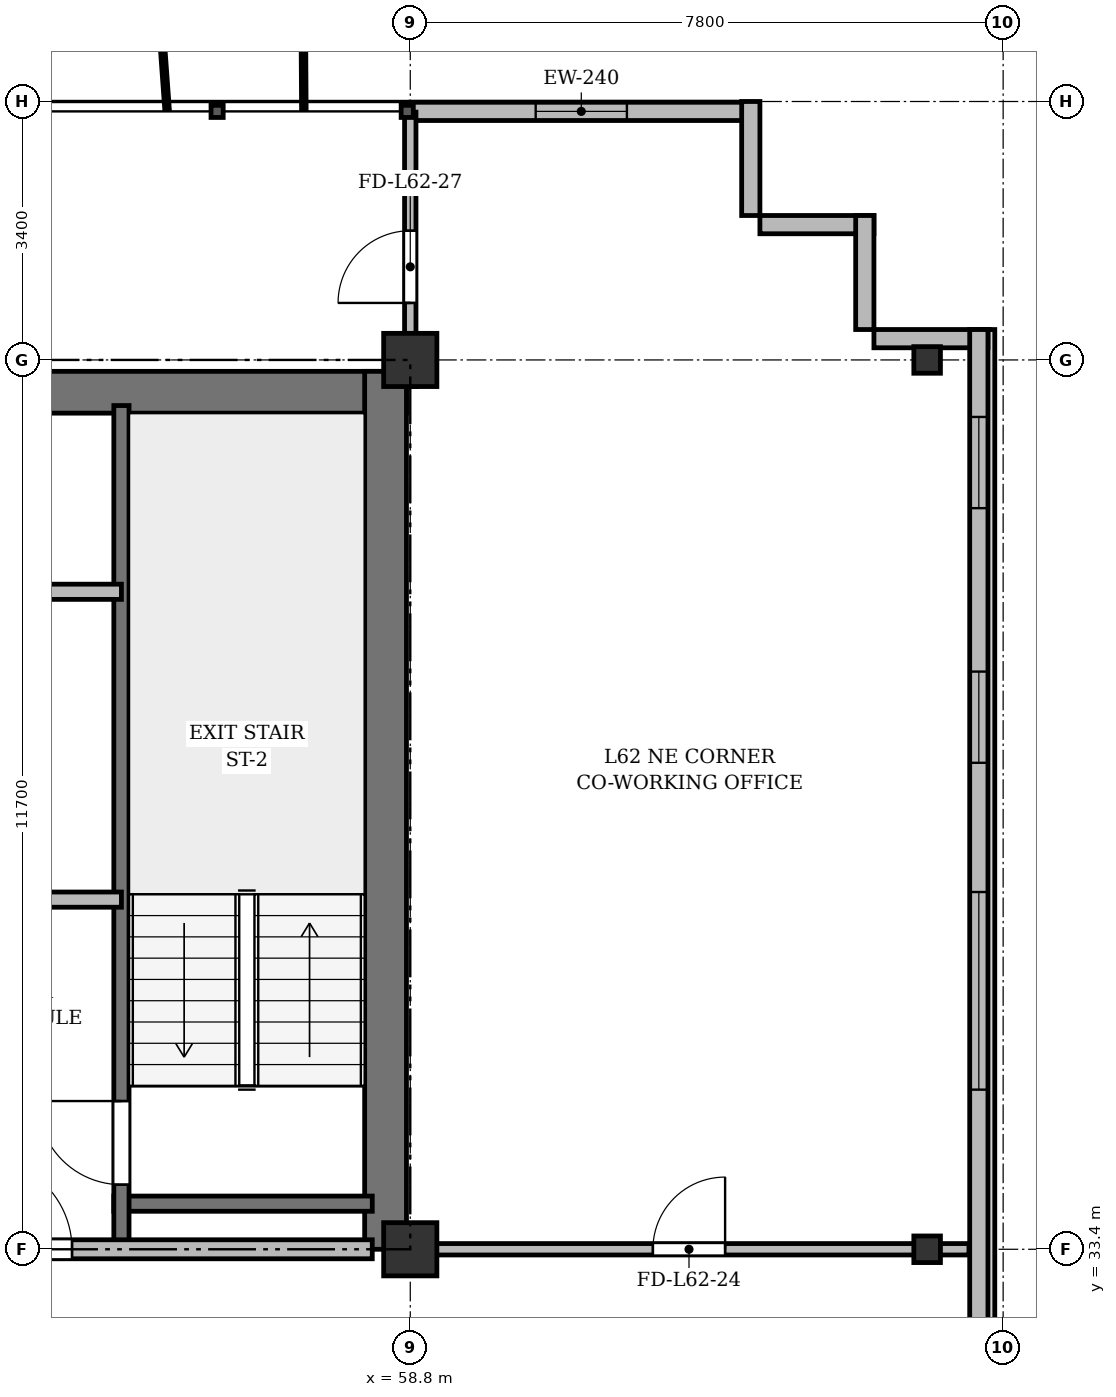
"""IFC4 building model, lengths in metres.
Left out: names, types, materials, properties, quantities, classifications, styles, units other than length and angle.
Written with IfcOpenShell. Run it as: python <this file> out.ifc"""

import sys

from ifc_helpers import new_model, si_unit, direction, frame, frame_2d, origin, origin_2d, place, context, subcontext, project, spatial, rectangle, i_section, extrude, source, transform, mapped, element, fill, save


model = new_model("IFC4")
c1 = context("Model", 3, precision=1e-05, world=origin(), true_north=direction((0.0, 1.0)))
c2 = subcontext(c1, "Body", "Model", "MODEL_VIEW")
j1 = project(units=[si_unit("LENGTHUNIT", "METRE"), si_unit("PLANEANGLEUNIT", "RADIAN")], contexts=[c1])
p1 = place(None, origin())
s1 = spatial("IfcSite", under=j1, at=p1, CompositionType="ELEMENT")
p2 = place(p1, origin())
s2 = spatial("IfcBuilding", under=s1, at=p2, CompositionType="ELEMENT")
p3 = place(p2, frame((0.0, 0.0, 237.3)))
s3 = spatial("IfcBuildingStorey", under=s2, at=p3, CompositionType="ELEMENT", Elevation=237.3)
m1 = source(origin(), c2, "Body", "SweptSolid", [
    extrude(rectangle(XDim=0.7, YDim=0.7, at=origin_2d()), origin(), (0.0, 0.0, 1.0), 3.6),
])
for number, where, z_axis, x_axis in (
    (1, (58.8, 33.4, 0.0), (0.0, 0.0, 1.0), (1.0, 0.0, 0.0)),
    (2, (58.8, 45.1, 0.0), (0.0, 0.0, 1.0), (1.0, 0.0, 0.0)),
):
    element("IfcColumn", number, at=place(p3, frame(where, z_axis=z_axis, x_axis=x_axis)), inside=s3, PredefinedType="COLUMN", context=c2, shape_type="MappedRepresentation", body=[
        mapped(m1, transform((0.0, 0.0, 0.0), x_axis=(1.0, 0.0, 0.0), y_axis=(0.0, 1.0, 0.0), z_axis=(0.0, 0.0, 1.0), scale=1.0)),
    ])
m2 = source(origin(), c2, "Body", "SweptSolid", [
    extrude(i_section(OverallWidth=0.35, OverallDepth=0.35, WebThickness=0.018, FlangeThickness=0.028, at=origin_2d()), origin(), (0.0, 0.0, 1.0), 3.6),
])
for number, where, z_axis, x_axis in (
    (3, (65.6, 33.4, 0.0), (0.0, 0.0, 1.0), (1.0, 0.0, 0.0)),
    (4, (65.6, 45.1, 0.0), (0.0, 0.0, 1.0), (1.0, 0.0, 0.0)),
):
    element("IfcColumn", number, at=place(p3, frame(where, z_axis=z_axis, x_axis=x_axis)), inside=s3, PredefinedType="COLUMN", context=c2, shape_type="MappedRepresentation", body=[
        mapped(m2, transform((0.0, 0.0, 0.0), x_axis=(1.0, 0.0, 0.0), y_axis=(0.0, 1.0, 0.0), z_axis=(0.0, 0.0, 1.0), scale=1.0)),
    ])
p4 = place(p3, frame((58.8, 48.37, 0.0), z_axis=(0.0, 0.0, 1.0), x_axis=(1.0, 0.0, 0.0)))
e5 = element("IfcWall", 5, at=p4, inside=s3, PredefinedType="SOLIDWALL", context=c2, shape_type="SweptSolid", body=[
    extrude(rectangle(XDim=4.5, YDim=0.24, at=frame_2d((2.25, 0.0))), origin(), (0.0, 0.0, 1.0), 3.22),
])
p5 = place(p4, frame((1.65, 0.0, 0.9)))
e6 = element("IfcOpeningElement", 6, at=p5, cuts=e5, PredefinedType="OPENING", context=c2, shape_type="SweptSolid", body=[
    extrude(rectangle(XDim=1.2, YDim=1.65, at=frame_2d((0.6, 0.825))), frame((0.0, 0.13, 0.0), z_axis=(0.0, -1.0, 0.0), x_axis=(1.0, 0.0, 0.0)), (0.0, 0.0, 1.0), 0.26),
])
for number, where, z_axis, x_axis in (
    (7, (63.28, 48.5, 0.0), (0.0, 0.0, 1.0), (0.0, -1.0, 0.0)),
    (8, (63.4, 46.88, 0.0), (0.0, 0.0, 1.0), (1.0, 0.0, 0.0)),
    (9, (64.78, 47.0, 0.0), (0.0, 0.0, 1.0), (0.0, -1.0, 0.0)),
    (10, (64.9, 45.38, 0.0), (0.0, 0.0, 1.0), (1.0, 0.0, 0.0)),
):
    element("IfcWall", number, at=place(p3, frame(where, z_axis=z_axis, x_axis=x_axis)), inside=s3, PredefinedType="SOLIDWALL", context=c2, shape_type="SweptSolid", body=[
        extrude(rectangle(XDim=1.5, YDim=0.24, at=frame_2d((0.75, 0.0))), origin(), (0.0, 0.0, 1.0), 3.22),
    ])
p6 = place(p3, frame((66.28, 45.5, 0.0), z_axis=(0.0, 0.0, 1.0), x_axis=(0.0, -1.0, 0.0)))
e11 = element("IfcWall", 11, at=p6, inside=s3, PredefinedType="SOLIDWALL", context=c2, shape_type="SweptSolid", body=[
    extrude(rectangle(XDim=39.1, YDim=0.24, at=frame_2d((19.55, 0.0))), origin(), (0.0, 0.0, 1.0), 3.22),
])
p7 = place(p6, frame((36.45, 0.0, 0.92)))
e12 = element("IfcOpeningElement", 12, at=p7, cuts=e11, PredefinedType="OPENING", context=c2, shape_type="SweptSolid", body=[
    extrude(rectangle(XDim=1.2, YDim=1.65, at=frame_2d((0.6, 0.825))), frame((0.0, 0.13, 0.0), z_axis=(0.0, -1.0, 0.0), x_axis=(1.0, 0.0, 0.0)), (0.0, 0.0, 1.0), 0.26),
])
p8 = place(p6, frame((32.8, 0.0, 0.92)))
e13 = element("IfcOpeningElement", 13, at=p8, cuts=e11, PredefinedType="OPENING", context=c2, shape_type="SweptSolid", body=[
    extrude(rectangle(XDim=2.6, YDim=1.9, at=frame_2d((1.3, 0.95))), frame((0.0, 0.13, 0.0), z_axis=(0.0, -1.0, 0.0), x_axis=(1.0, 0.0, 0.0)), (0.0, 0.0, 1.0), 0.26),
])
p9 = place(p6, frame((28.6, 0.0, 0.92)))
e14 = element("IfcOpeningElement", 14, at=p9, cuts=e11, PredefinedType="OPENING", context=c2, shape_type="SweptSolid", body=[
    extrude(rectangle(XDim=2.6, YDim=1.9, at=frame_2d((1.3, 0.95))), frame((0.0, 0.13, 0.0), z_axis=(0.0, -1.0, 0.0), x_axis=(1.0, 0.0, 0.0)), (0.0, 0.0, 1.0), 0.26),
])
p10 = place(p6, frame((21.4, 0.0, 0.92)))
e15 = element("IfcOpeningElement", 15, at=p10, cuts=e11, PredefinedType="OPENING", context=c2, shape_type="SweptSolid", body=[
    extrude(rectangle(XDim=2.6, YDim=1.9, at=frame_2d((1.3, 0.95))), frame((0.0, 0.13, 0.0), z_axis=(0.0, -1.0, 0.0), x_axis=(1.0, 0.0, 0.0)), (0.0, 0.0, 1.0), 0.26),
])
p11 = place(p6, frame((7.4, 0.0, 0.92)))
e16 = element("IfcOpeningElement", 16, at=p11, cuts=e11, PredefinedType="OPENING", context=c2, shape_type="SweptSolid", body=[
    extrude(rectangle(XDim=2.6, YDim=1.9, at=frame_2d((1.3, 0.95))), frame((0.0, 0.13, 0.0), z_axis=(0.0, -1.0, 0.0), x_axis=(1.0, 0.0, 0.0)), (0.0, 0.0, 1.0), 0.26),
])
p12 = place(p6, frame((4.5, 0.0, 0.92)))
e17 = element("IfcOpeningElement", 17, at=p12, cuts=e11, PredefinedType="OPENING", context=c2, shape_type="SweptSolid", body=[
    extrude(rectangle(XDim=1.2, YDim=1.65, at=frame_2d((0.6, 0.825))), frame((0.0, 0.13, 0.0), z_axis=(0.0, -1.0, 0.0), x_axis=(1.0, 0.0, 0.0)), (0.0, 0.0, 1.0), 0.26),
])
p13 = place(p6, frame((1.15, 0.0, 0.92)))
e18 = element("IfcOpeningElement", 18, at=p13, cuts=e11, PredefinedType="OPENING", context=c2, shape_type="SweptSolid", body=[
    extrude(rectangle(XDim=1.2, YDim=1.65, at=frame_2d((0.6, 0.825))), frame((0.0, 0.13, 0.0), z_axis=(0.0, -1.0, 0.0), x_axis=(1.0, 0.0, 0.0)), (0.0, 0.0, 1.0), 0.26),
])
p14 = place(p3, frame((15.65, 44.675, 0.0), z_axis=(0.0, 0.0, 1.0), x_axis=(1.0, 0.0, 0.0)))
e19 = element("IfcWall", 19, at=p14, inside=s3, PredefinedType="SHEAR", context=c2, shape_type="SweptSolid", body=[
    extrude(rectangle(XDim=43.1, YDim=0.55, at=frame_2d((21.55, 0.0))), origin(), (0.0, 0.0, 1.0), 3.22),
])
p15 = place(p3, frame((58.475, 33.4, 0.0), z_axis=(0.0, 0.0, 1.0), x_axis=(0.0, 1.0, 0.0)))
e20 = element("IfcWall", 20, at=p15, inside=s3, PredefinedType="SHEAR", context=c2, shape_type="SweptSolid", body=[
    extrude(rectangle(XDim=11.55, YDim=0.55, at=frame_2d((5.775, 0.0))), origin(), (0.0, 0.0, 1.0), 3.22),
])
p16 = place(p3, frame((54.9, 34.0, 0.0), z_axis=(0.0, 0.0, 1.0), x_axis=(1.0, 0.0, 0.0)))
e21 = element("IfcWall", 21, at=p16, inside=s3, PredefinedType="SHEAR", context=c2, shape_type="SweptSolid", body=[
    extrude(rectangle(XDim=3.4, YDim=0.2, at=frame_2d((1.7, 0.0))), origin(), (0.0, 0.0, 1.0), 3.22),
])
p17 = place(p3, frame((55.0, 33.4, 0.0), z_axis=(0.0, 0.0, 1.0), x_axis=(0.0, 1.0, 0.0)))
e22 = element("IfcWall", 22, at=p17, inside=s3, PredefinedType="SHEAR", context=c2, shape_type="SweptSolid", body=[
    extrude(rectangle(XDim=11.1, YDim=0.2, at=frame_2d((5.55, 0.0))), origin(), (0.0, 0.0, 1.0), 3.22),
])
p18 = place(p17, frame((0.85, 0.0, 0.0)))
e23 = element("IfcOpeningElement", 23, at=p18, cuts=e22, PredefinedType="OPENING", context=c2, shape_type="SweptSolid", body=[
    extrude(rectangle(XDim=1.1, YDim=2.15, at=frame_2d((0.55, 1.075))), frame((0.0, 0.11, 0.0), z_axis=(0.0, -1.0, 0.0), x_axis=(1.0, 0.0, 0.0)), (0.0, 0.0, 1.0), 0.22),
])
p19 = place(p3, frame((47.15, 42.05, 0.0), z_axis=(0.0, 0.0, 1.0), x_axis=(1.0, 0.0, 0.0)))
e24 = element("IfcWall", 24, at=p19, inside=s3, PredefinedType="SOLIDWALL", context=c2, shape_type="SweptSolid", body=[
    extrude(rectangle(XDim=7.85, YDim=0.2, at=frame_2d((3.925, 0.0))), origin(), (0.0, 0.0, 1.0), 2.72),
])
p20 = place(p19, frame((0.75, 0.0, 0.0)))
e25 = element("IfcOpeningElement", 25, at=p20, cuts=e24, PredefinedType="OPENING", context=c2, shape_type="SweptSolid", body=[
    extrude(rectangle(XDim=0.9, YDim=2.1, at=frame_2d((0.45, 1.05))), frame((0.0, 0.11, 0.0), z_axis=(0.0, -1.0, 0.0), x_axis=(1.0, 0.0, 0.0)), (0.0, 0.0, 1.0), 0.22),
])
p21 = place(p19, frame((3.85, 0.0, 0.0)))
e26 = element("IfcOpeningElement", 26, at=p21, cuts=e24, PredefinedType="OPENING", context=c2, shape_type="SweptSolid", body=[
    extrude(rectangle(XDim=0.9, YDim=2.1, at=frame_2d((0.45, 1.05))), frame((0.0, 0.11, 0.0), z_axis=(0.0, -1.0, 0.0), x_axis=(1.0, 0.0, 0.0)), (0.0, 0.0, 1.0), 0.22),
])
p22 = place(p3, frame((52.45, 38.0, 0.0), z_axis=(0.0, 0.0, 1.0), x_axis=(1.0, 0.0, 0.0)))
e27 = element("IfcWall", 27, at=p22, inside=s3, PredefinedType="PARTITIONING", context=c2, shape_type="SweptSolid", body=[
    extrude(rectangle(XDim=2.55, YDim=0.2, at=frame_2d((1.275, 0.0))), origin(), (0.0, 0.0, 1.0), 3.22),
])
p23 = place(p3, frame((47.15, 33.4, 0.0), z_axis=(0.0, 0.0, 1.0), x_axis=(1.0, 0.0, 0.0)))
e28 = element("IfcWall", 28, at=p23, inside=s3, PredefinedType="PARTITIONING", context=c2, shape_type="SweptSolid", body=[
    extrude(rectangle(XDim=11.15, YDim=0.25, at=frame_2d((5.575, 0.0))), origin(), (0.0, 0.0, 1.0), 2.77),
])
p24 = place(p23, frame((0.7, 0.0, 0.0)))
e29 = element("IfcOpeningElement", 29, at=p24, cuts=e28, PredefinedType="OPENING", context=c2, shape_type="SweptSolid", body=[
    extrude(rectangle(XDim=0.95, YDim=2.15, at=frame_2d((0.475, 1.075))), frame((0.0, 0.135, 0.0), z_axis=(0.0, -1.0, 0.0), x_axis=(1.0, 0.0, 0.0)), (0.0, 0.0, 1.0), 0.27),
])
p25 = place(p23, frame((6.0, 0.0, 0.0)))
e30 = element("IfcOpeningElement", 30, at=p25, cuts=e28, PredefinedType="OPENING", context=c2, shape_type="SweptSolid", body=[
    extrude(rectangle(XDim=1.2, YDim=2.15, at=frame_2d((0.6, 1.075))), frame((0.0, 0.135, 0.0), z_axis=(0.0, -1.0, 0.0), x_axis=(1.0, 0.0, 0.0)), (0.0, 0.0, 1.0), 0.27),
])
p26 = place(p3, frame((58.8, 33.4, 0.0), z_axis=(0.0, 0.0, 1.0), x_axis=(1.0, 0.0, 0.0)))
e31 = element("IfcWall", 31, at=p26, inside=s3, PredefinedType="PARTITIONING", context=c2, shape_type="SweptSolid", body=[
    extrude(rectangle(XDim=7.35, YDim=0.15, at=frame_2d((3.675, 0.0))), origin(), (0.0, 0.0, 1.0), 2.77),
])
p27 = place(p26, frame((3.192, 0.0, 0.0)))
e32 = element("IfcOpeningElement", 32, at=p27, cuts=e31, PredefinedType="OPENING", context=c2, shape_type="SweptSolid", body=[
    extrude(rectangle(XDim=0.95, YDim=2.15, at=frame_2d((0.475, 1.075))), frame((0.0, 0.085, 0.0), z_axis=(0.0, -1.0, 0.0), x_axis=(1.0, 0.0, 0.0)), (0.0, 0.0, 1.0), 0.17),
])
p28 = place(p3, frame((58.8, 44.75, 0.0), z_axis=(0.0, 0.0, 1.0), x_axis=(0.0, 1.0, 0.0)))
e33 = element("IfcWall", 33, at=p28, inside=s3, PredefinedType="PARTITIONING", context=c2, shape_type="SweptSolid", body=[
    extrude(rectangle(XDim=3.61, YDim=0.15, at=frame_2d((1.805, 0.0))), origin(), (0.0, 0.0, 1.0), 2.72),
])
p29 = place(p28, frame((1.1, 0.0, 0.0)))
e34 = element("IfcOpeningElement", 34, at=p29, cuts=e33, PredefinedType="OPENING", context=c2, shape_type="SweptSolid", body=[
    extrude(rectangle(XDim=0.95, YDim=2.15, at=frame_2d((0.475, 1.075))), frame((0.0, 0.085, 0.0), z_axis=(0.0, -1.0, 0.0), x_axis=(1.0, 0.0, 0.0)), (0.0, 0.0, 1.0), 0.17),
])
m3 = source(origin(), c2, "Body", "SweptSolid", [
    extrude(rectangle(XDim=1.2, YDim=1.65, at=frame_2d((0.6, 0.825))), frame((0.0, 0.03, 0.0), z_axis=(0.0, -1.0, 0.0), x_axis=(1.0, 0.0, 0.0)), (0.0, 0.0, 1.0), 0.06),
])
p30 = place(p5, origin())
e35 = element("IfcWindow", 35, at=p30, inside=s3, PartitioningType="SINGLE_PANEL", PredefinedType="WINDOW", context=c2, shape_type="MappedRepresentation", body=[
    mapped(m3, transform((0.0, 0.0, 0.0), x_axis=(1.0, 0.0, 0.0), y_axis=(0.0, 1.0, 0.0), z_axis=(0.0, 0.0, 1.0), scale=1.0)),
])
fill(e6, e35)
m4 = source(origin(), c2, "Body", "SweptSolid", [
    extrude(rectangle(XDim=2.6, YDim=1.9, at=frame_2d((1.3, 0.95))), frame((0.0, 0.03, 0.0), z_axis=(0.0, -1.0, 0.0), x_axis=(1.0, 0.0, 0.0)), (0.0, 0.0, 1.0), 0.06),
])
p31 = place(p11, origin())
e36 = element("IfcWindow", 36, at=p31, inside=s3, PartitioningType="SINGLE_PANEL", PredefinedType="WINDOW", context=c2, shape_type="MappedRepresentation", body=[
    mapped(m4, transform((0.0, 0.0, 0.0), x_axis=(1.0, 0.0, 0.0), y_axis=(0.0, 1.0, 0.0), z_axis=(0.0, 0.0, 1.0), scale=1.0)),
])
fill(e16, e36)
p32 = place(p12, origin())
e37 = element("IfcWindow", 37, at=p32, inside=s3, PartitioningType="SINGLE_PANEL", PredefinedType="WINDOW", context=c2, shape_type="MappedRepresentation", body=[
    mapped(m3, transform((0.0, 0.0, 0.0), x_axis=(1.0, 0.0, 0.0), y_axis=(0.0, 1.0, 0.0), z_axis=(0.0, 0.0, 1.0), scale=1.0)),
])
fill(e17, e37)
p33 = place(p13, origin())
e38 = element("IfcWindow", 38, at=p33, inside=s3, PartitioningType="SINGLE_PANEL", PredefinedType="WINDOW", context=c2, shape_type="MappedRepresentation", body=[
    mapped(m3, transform((0.0, 0.0, 0.0), x_axis=(1.0, 0.0, 0.0), y_axis=(0.0, 1.0, 0.0), z_axis=(0.0, 0.0, 1.0), scale=1.0)),
])
fill(e18, e38)
m5 = source(origin(), c2, "Body", "SweptSolid", [
    extrude(rectangle(XDim=1.1, YDim=2.15, at=frame_2d((0.55, 1.075))), frame((0.0, 0.025, 0.0), z_axis=(0.0, -1.0, 0.0), x_axis=(1.0, 0.0, 0.0)), (0.0, 0.0, 1.0), 0.05),
])
p34 = place(p18, origin())
e39 = element("IfcDoor", 39, at=p34, inside=s3, OperationType="SINGLE_SWING_RIGHT", PredefinedType="DOOR", context=c2, shape_type="MappedRepresentation", body=[
    mapped(m5, transform((0.0, 0.0, 0.0), x_axis=(1.0, 0.0, 0.0), y_axis=(0.0, 1.0, 0.0), z_axis=(0.0, 0.0, 1.0), scale=1.0)),
])
fill(e23, e39)
m6 = source(origin(), c2, "Body", "SweptSolid", [
    extrude(rectangle(XDim=1.2, YDim=2.15, at=frame_2d((0.6, 1.075))), frame((0.0, 0.025, 0.0), z_axis=(0.0, -1.0, 0.0), x_axis=(1.0, 0.0, 0.0)), (0.0, 0.0, 1.0), 0.05),
])
p35 = place(p25, origin())
e40 = element("IfcDoor", 40, at=p35, inside=s3, OperationType="SINGLE_SWING_LEFT", PredefinedType="DOOR", context=c2, shape_type="MappedRepresentation", body=[
    mapped(m6, transform((0.0, 0.0, 0.0), x_axis=(1.0, 0.0, 0.0), y_axis=(0.0, 1.0, 0.0), z_axis=(0.0, 0.0, 1.0), scale=1.0)),
])
fill(e30, e40)
m7 = source(origin(), c2, "Body", "SweptSolid", [
    extrude(rectangle(XDim=0.95, YDim=2.15, at=frame_2d((0.475, 1.075))), frame((0.0, 0.025, 0.0), z_axis=(0.0, -1.0, 0.0), x_axis=(1.0, 0.0, 0.0)), (0.0, 0.0, 1.0), 0.05),
])
p36 = place(p27, origin())
e41 = element("IfcDoor", 41, at=p36, inside=s3, OperationType="SINGLE_SWING_RIGHT", PredefinedType="DOOR", context=c2, shape_type="MappedRepresentation", body=[
    mapped(m7, transform((0.0, 0.0, 0.0), x_axis=(1.0, 0.0, 0.0), y_axis=(0.0, 1.0, 0.0), z_axis=(0.0, 0.0, 1.0), scale=1.0)),
])
fill(e32, e41)
p37 = place(p29, origin())
e42 = element("IfcDoor", 42, at=p37, inside=s3, OperationType="SINGLE_SWING_LEFT", PredefinedType="DOOR", context=c2, shape_type="MappedRepresentation", body=[
    mapped(m7, transform((0.0, 0.0, 0.0), x_axis=(1.0, 0.0, 0.0), y_axis=(0.0, 1.0, 0.0), z_axis=(0.0, 0.0, 1.0), scale=1.0)),
])
fill(e34, e42)
save(model, sys.argv[1])
